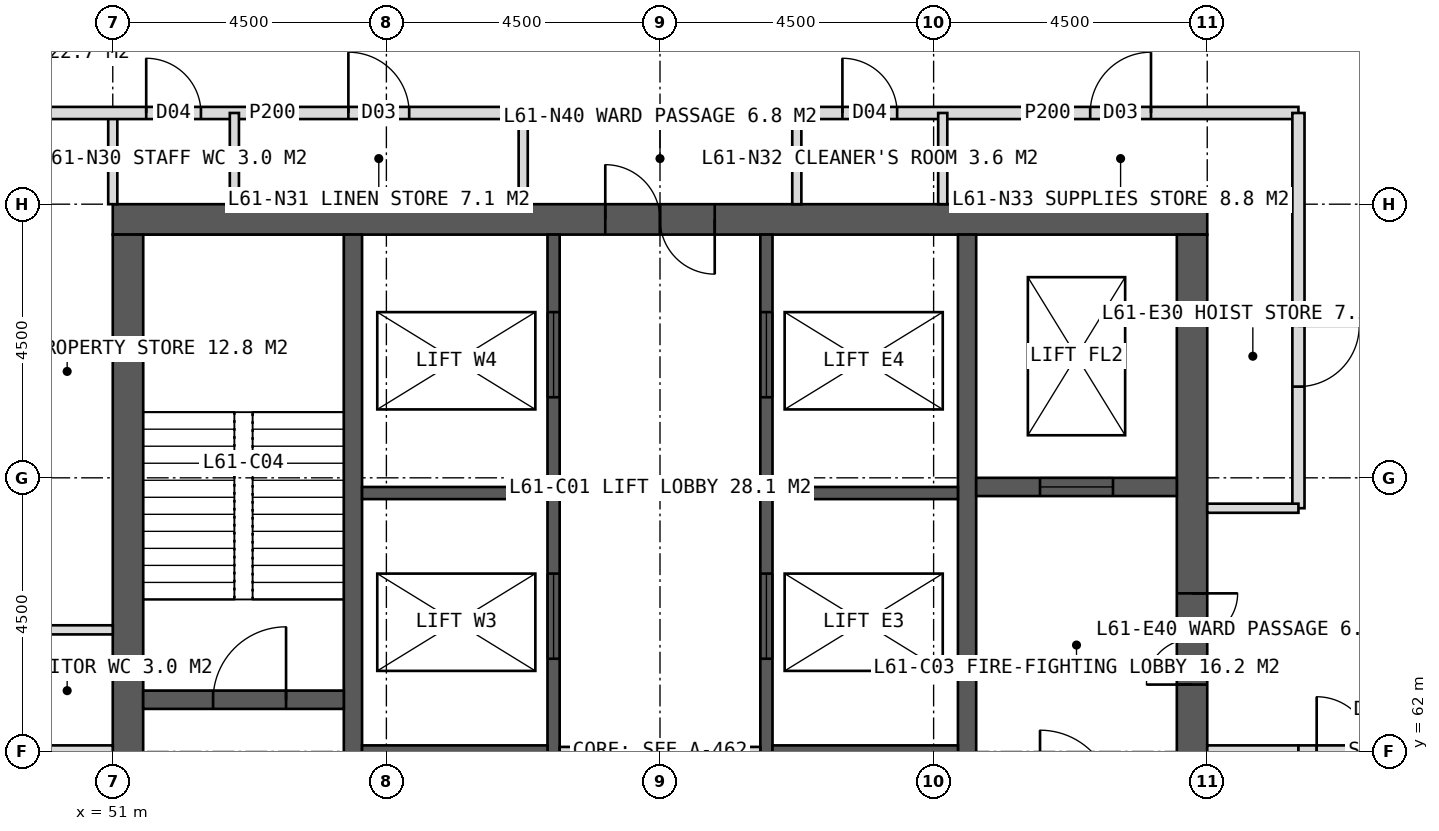
"""IFC4 building model, lengths in metres.
Left out: names, types, materials, properties, quantities, classifications, styles, units other than length and angle.
Written with IfcOpenShell. Run it as: python <this file> out.ifc"""

import sys

from ifc_helpers import new_model, si_unit, direction, frame, frame_2d, origin, place, context, subcontext, project, spatial, rectangle, extrude, element, fill, save


model = new_model("IFC4")
c1 = context("Model", 3, precision=1e-05, world=origin(), true_north=direction((0.0, 1.0)))
c2 = subcontext(c1, "Body", "Model", "MODEL_VIEW")
j1 = project(units=[si_unit("LENGTHUNIT", "METRE"), si_unit("PLANEANGLEUNIT", "RADIAN")], contexts=[c1])
p1 = place(None, origin())
s1 = spatial("IfcSite", under=j1, at=p1, CompositionType="ELEMENT")
p2 = place(p1, origin())
s2 = spatial("IfcBuilding", under=s1, at=p2, CompositionType="ELEMENT")
p3 = place(p2, frame((0.0, 0.0, 254.0)))
s3 = spatial("IfcBuildingStorey", under=s2, at=p3, CompositionType="ELEMENT", Elevation=254.0)
p4 = place(p3, frame((51.0, 70.75, 0.0), z_axis=(0.0, 0.0, 1.0), x_axis=(1.0, 0.0, 0.0)))
e1 = element("IfcWall", 1, at=p4, inside=s3, PredefinedType="SHEAR", context=c2, shape_type="SweptSolid", body=[
    extrude(rectangle(XDim=18.0, YDim=0.5, at=frame_2d((9.0, 0.0))), origin(), (0.0, 0.0, 1.0), 4.0),
])
p5 = place(p4, frame((8.1, 0.0, 0.0)))
e2 = element("IfcOpeningElement", 2, at=p5, cuts=e1, PredefinedType="OPENING", context=c2, shape_type="SweptSolid", body=[
    extrude(rectangle(XDim=1.8, YDim=2.2, at=frame_2d((0.9, 1.1))), frame((0.0, 0.26, 0.0), z_axis=(0.0, -1.0, 0.0), x_axis=(1.0, 0.0, 0.0)), (0.0, 0.0, 1.0), 0.52),
])
p6 = place(p3, frame((51.25, 53.5, 0.0), z_axis=(0.0, 0.0, 1.0), x_axis=(0.0, 1.0, 0.0)))
e3 = element("IfcWall", 3, at=p6, inside=s3, PredefinedType="SHEAR", context=c2, shape_type="SweptSolid", body=[
    extrude(rectangle(XDim=17.0, YDim=0.5, at=frame_2d((8.5, 0.0))), origin(), (0.0, 0.0, 1.0), 4.0),
])
p7 = place(p6, frame((6.1, 0.0, 0.0)))
e4 = element("IfcOpeningElement", 4, at=p7, cuts=e3, PredefinedType="OPENING", context=c2, shape_type="SweptSolid", body=[
    extrude(rectangle(XDim=1.5, YDim=2.2, at=frame_2d((0.75, 1.1))), frame((0.0, 0.26, 0.0), z_axis=(0.0, -1.0, 0.0), x_axis=(1.0, 0.0, 0.0)), (0.0, 0.0, 1.0), 0.52),
])
p8 = place(p3, frame((68.75, 53.5, 0.0), z_axis=(0.0, 0.0, 1.0), x_axis=(0.0, 1.0, 0.0)))
e5 = element("IfcWall", 5, at=p8, inside=s3, PredefinedType="SHEAR", context=c2, shape_type="SweptSolid", body=[
    extrude(rectangle(XDim=17.0, YDim=0.5, at=frame_2d((8.5, 0.0))), origin(), (0.0, 0.0, 1.0), 4.0),
])
p9 = place(p8, frame((9.6, 0.0, 0.0)))
e6 = element("IfcOpeningElement", 6, at=p9, cuts=e5, PredefinedType="OPENING", context=c2, shape_type="SweptSolid", body=[
    extrude(rectangle(XDim=1.5, YDim=2.2, at=frame_2d((0.75, 1.1))), frame((0.0, 0.26, 0.0), z_axis=(0.0, -1.0, 0.0), x_axis=(1.0, 0.0, 0.0)), (0.0, 0.0, 1.0), 0.52),
])
for number, where, z_axis, x_axis in (
    (7, (54.95, 53.5, 0.0), (0.0, 0.0, 1.0), (0.0, 1.0, 0.0)),
    (8, (65.05, 53.5, 0.0), (0.0, 0.0, 1.0), (0.0, 1.0, 0.0)),
):
    element("IfcWall", number, at=place(p3, frame(where, z_axis=z_axis, x_axis=x_axis)), inside=s3, PredefinedType="SHEAR", context=c2, shape_type="SweptSolid", body=[
        extrude(rectangle(XDim=17.0, YDim=0.3, at=frame_2d((8.5, 0.0))), origin(), (0.0, 0.0, 1.0), 4.0),
    ])
p10 = place(p3, frame((58.25, 53.5, 0.0), z_axis=(0.0, 0.0, 1.0), x_axis=(0.0, 1.0, 0.0)))
e9 = element("IfcWall", 9, at=p10, inside=s3, PredefinedType="SHEAR", context=c2, shape_type="SweptSolid", body=[
    extrude(rectangle(XDim=17.0, YDim=0.2, at=frame_2d((8.5, 0.0))), origin(), (0.0, 0.0, 1.0), 4.0),
])
p11 = place(p10, frame((0.808, 0.0, 0.0)))
e10 = element("IfcOpeningElement", 10, at=p11, cuts=e9, PredefinedType="OPENING", context=c2, shape_type="SweptSolid", body=[
    extrude(rectangle(XDim=1.0, YDim=2.1, at=frame_2d((0.5, 1.05))), frame((0.0, 0.11, 0.0), z_axis=(0.0, -1.0, 0.0), x_axis=(1.0, 0.0, 0.0)), (0.0, 0.0, 1.0), 0.22),
])
p12 = place(p10, frame((2.958, 0.0, 0.0)))
e11 = element("IfcOpeningElement", 11, at=p12, cuts=e9, PredefinedType="OPENING", context=c2, shape_type="SweptSolid", body=[
    extrude(rectangle(XDim=1.0, YDim=2.1, at=frame_2d((0.5, 1.05))), frame((0.0, 0.11, 0.0), z_axis=(0.0, -1.0, 0.0), x_axis=(1.0, 0.0, 0.0)), (0.0, 0.0, 1.0), 0.22),
])
p13 = place(p10, frame((4.722, 0.0, 0.0)))
e12 = element("IfcOpeningElement", 12, at=p13, cuts=e9, PredefinedType="OPENING", context=c2, shape_type="SweptSolid", body=[
    extrude(rectangle(XDim=1.0, YDim=2.1, at=frame_2d((0.5, 1.05))), frame((0.0, 0.11, 0.0), z_axis=(0.0, -1.0, 0.0), x_axis=(1.0, 0.0, 0.0)), (0.0, 0.0, 1.0), 0.22),
])
p14 = place(p10, frame((6.823, 0.0, 0.0)))
e13 = element("IfcOpeningElement", 13, at=p14, cuts=e9, PredefinedType="OPENING", context=c2, shape_type="SweptSolid", body=[
    extrude(rectangle(XDim=1.0, YDim=2.1, at=frame_2d((0.5, 1.05))), frame((0.0, 0.11, 0.0), z_axis=(0.0, -1.0, 0.0), x_axis=(1.0, 0.0, 0.0)), (0.0, 0.0, 1.0), 0.22),
])
p15 = place(p10, frame((10.025, 0.0, 0.0)))
e14 = element("IfcOpeningElement", 14, at=p15, cuts=e9, PredefinedType="OPENING", context=c2, shape_type="SweptSolid", body=[
    extrude(rectangle(XDim=1.4, YDim=2.2, at=frame_2d((0.7, 1.1))), frame((0.0, 0.11, 0.0), z_axis=(0.0, -1.0, 0.0), x_axis=(1.0, 0.0, 0.0)), (0.0, 0.0, 1.0), 0.22),
])
p16 = place(p10, frame((14.325, 0.0, 0.0)))
e15 = element("IfcOpeningElement", 15, at=p16, cuts=e9, PredefinedType="OPENING", context=c2, shape_type="SweptSolid", body=[
    extrude(rectangle(XDim=1.4, YDim=2.2, at=frame_2d((0.7, 1.1))), frame((0.0, 0.11, 0.0), z_axis=(0.0, -1.0, 0.0), x_axis=(1.0, 0.0, 0.0)), (0.0, 0.0, 1.0), 0.22),
])
p17 = place(p3, frame((61.75, 53.5, 0.0), z_axis=(0.0, 0.0, 1.0), x_axis=(0.0, 1.0, 0.0)))
e16 = element("IfcWall", 16, at=p17, inside=s3, PredefinedType="SHEAR", context=c2, shape_type="SweptSolid", body=[
    extrude(rectangle(XDim=17.0, YDim=0.2, at=frame_2d((8.5, 0.0))), origin(), (0.0, 0.0, 1.0), 4.0),
])
p18 = place(p17, frame((0.496, 0.0, 0.0)))
e17 = element("IfcOpeningElement", 17, at=p18, cuts=e16, PredefinedType="OPENING", context=c2, shape_type="SweptSolid", body=[
    extrude(rectangle(XDim=1.0, YDim=2.1, at=frame_2d((0.5, 1.05))), frame((0.0, 0.11, 0.0), z_axis=(0.0, -1.0, 0.0), x_axis=(1.0, 0.0, 0.0)), (0.0, 0.0, 1.0), 0.22),
])
p19 = place(p17, frame((2.646, 0.0, 0.0)))
e18 = element("IfcOpeningElement", 18, at=p19, cuts=e16, PredefinedType="OPENING", context=c2, shape_type="SweptSolid", body=[
    extrude(rectangle(XDim=1.0, YDim=2.1, at=frame_2d((0.5, 1.05))), frame((0.0, 0.11, 0.0), z_axis=(0.0, -1.0, 0.0), x_axis=(1.0, 0.0, 0.0)), (0.0, 0.0, 1.0), 0.22),
])
p20 = place(p17, frame((5.027, 0.0, 0.0)))
e19 = element("IfcOpeningElement", 19, at=p20, cuts=e16, PredefinedType="OPENING", context=c2, shape_type="SweptSolid", body=[
    extrude(rectangle(XDim=1.0, YDim=2.1, at=frame_2d((0.5, 1.05))), frame((0.0, 0.11, 0.0), z_axis=(0.0, -1.0, 0.0), x_axis=(1.0, 0.0, 0.0)), (0.0, 0.0, 1.0), 0.22),
])
p21 = place(p17, frame((7.126, 0.0, 0.0)))
e20 = element("IfcOpeningElement", 20, at=p21, cuts=e16, PredefinedType="OPENING", context=c2, shape_type="SweptSolid", body=[
    extrude(rectangle(XDim=1.0, YDim=2.1, at=frame_2d((0.5, 1.05))), frame((0.0, 0.11, 0.0), z_axis=(0.0, -1.0, 0.0), x_axis=(1.0, 0.0, 0.0)), (0.0, 0.0, 1.0), 0.22),
])
p22 = place(p17, frame((10.025, 0.0, 0.0)))
e21 = element("IfcOpeningElement", 21, at=p22, cuts=e16, PredefinedType="OPENING", context=c2, shape_type="SweptSolid", body=[
    extrude(rectangle(XDim=1.4, YDim=2.2, at=frame_2d((0.7, 1.1))), frame((0.0, 0.11, 0.0), z_axis=(0.0, -1.0, 0.0), x_axis=(1.0, 0.0, 0.0)), (0.0, 0.0, 1.0), 0.22),
])
p23 = place(p17, frame((14.325, 0.0, 0.0)))
e22 = element("IfcOpeningElement", 22, at=p23, cuts=e16, PredefinedType="OPENING", context=c2, shape_type="SweptSolid", body=[
    extrude(rectangle(XDim=1.4, YDim=2.2, at=frame_2d((0.7, 1.1))), frame((0.0, 0.11, 0.0), z_axis=(0.0, -1.0, 0.0), x_axis=(1.0, 0.0, 0.0)), (0.0, 0.0, 1.0), 0.22),
])
for number, where, z_axis, x_axis in (
    (23, (55.1, 62.0, 0.0), (0.0, 0.0, 1.0), (1.0, 0.0, 0.0)),
    (24, (61.85, 62.0, 0.0), (0.0, 0.0, 1.0), (1.0, 0.0, 0.0)),
    (25, (55.1, 66.25, 0.0), (0.0, 0.0, 1.0), (1.0, 0.0, 0.0)),
    (26, (61.85, 66.25, 0.0), (0.0, 0.0, 1.0), (1.0, 0.0, 0.0)),
):
    element("IfcWall", number, at=place(p3, frame(where, z_axis=z_axis, x_axis=x_axis)), inside=s3, PredefinedType="SHEAR", context=c2, shape_type="SweptSolid", body=[
        extrude(rectangle(XDim=3.05, YDim=0.2, at=frame_2d((1.525, 0.0))), origin(), (0.0, 0.0, 1.0), 4.0),
    ])
p24 = place(p3, frame((51.5, 62.85, 0.0), z_axis=(0.0, 0.0, 1.0), x_axis=(1.0, 0.0, 0.0)))
e27 = element("IfcWall", 27, at=p24, inside=s3, PredefinedType="SHEAR", context=c2, shape_type="SweptSolid", body=[
    extrude(rectangle(XDim=3.3, YDim=0.3, at=frame_2d((1.65, 0.0))), origin(), (0.0, 0.0, 1.0), 4.0),
])
p25 = place(p24, frame((1.15, 0.0, 0.0)))
e28 = element("IfcOpeningElement", 28, at=p25, cuts=e27, PredefinedType="OPENING", context=c2, shape_type="SweptSolid", body=[
    extrude(rectangle(XDim=1.2, YDim=2.1, at=frame_2d((0.6, 1.05))), frame((0.0, 0.16, 0.0), z_axis=(0.0, -1.0, 0.0), x_axis=(1.0, 0.0, 0.0)), (0.0, 0.0, 1.0), 0.32),
])
p26 = place(p3, frame((65.2, 66.35, 0.0), z_axis=(0.0, 0.0, 1.0), x_axis=(1.0, 0.0, 0.0)))
e29 = element("IfcWall", 29, at=p26, inside=s3, PredefinedType="SHEAR", context=c2, shape_type="SweptSolid", body=[
    extrude(rectangle(XDim=3.3, YDim=0.3, at=frame_2d((1.65, 0.0))), origin(), (0.0, 0.0, 1.0), 4.0),
])
p27 = place(p26, frame((1.05, 0.0, 0.0)))
e30 = element("IfcOpeningElement", 30, at=p27, cuts=e29, PredefinedType="OPENING", context=c2, shape_type="SweptSolid", body=[
    extrude(rectangle(XDim=1.2, YDim=2.2, at=frame_2d((0.6, 1.1))), frame((0.0, 0.16, 0.0), z_axis=(0.0, -1.0, 0.0), x_axis=(1.0, 0.0, 0.0)), (0.0, 0.0, 1.0), 0.32),
])
p28 = place(p3, frame((51.0, 71.0, 0.0), z_axis=(0.0, 0.0, 1.0), x_axis=(0.0, 1.0, 0.0)))
e31 = element("IfcWall", 31, at=p28, inside=s3, PredefinedType="PARTITIONING", context=c2, shape_type="SweptSolid", body=[
    extrude(rectangle(XDim=1.5, YDim=0.15, at=frame_2d((0.75, 0.0))), origin(), (0.0, 0.0, 1.0), 3.75),
])
p29 = place(p3, frame((49.5, 72.5, 0.0), z_axis=(0.0, 0.0, 1.0), x_axis=(1.0, 0.0, 0.0)))
e32 = element("IfcWall", 32, at=p29, inside=s3, PredefinedType="PARTITIONING", context=c2, shape_type="SweptSolid", body=[
    extrude(rectangle(XDim=8.25, YDim=0.2, at=frame_2d((4.125, 0.0))), origin(), (0.0, 0.0, 1.0), 3.75),
])
p30 = place(p29, frame((2.05, 0.0, 0.0)))
e33 = element("IfcOpeningElement", 33, at=p30, cuts=e32, PredefinedType="OPENING", context=c2, shape_type="SweptSolid", body=[
    extrude(rectangle(XDim=0.9, YDim=2.1, at=frame_2d((0.45, 1.05))), frame((0.0, 0.11, 0.0), z_axis=(0.0, -1.0, 0.0), x_axis=(1.0, 0.0, 0.0)), (0.0, 0.0, 1.0), 0.22),
])
p31 = place(p29, frame((5.375, 0.0, 0.0)))
e34 = element("IfcOpeningElement", 34, at=p31, cuts=e32, PredefinedType="OPENING", context=c2, shape_type="SweptSolid", body=[
    extrude(rectangle(XDim=1.0, YDim=2.1, at=frame_2d((0.5, 1.05))), frame((0.0, 0.11, 0.0), z_axis=(0.0, -1.0, 0.0), x_axis=(1.0, 0.0, 0.0)), (0.0, 0.0, 1.0), 0.22),
])
p32 = place(p3, frame((62.25, 72.5, 0.0), z_axis=(0.0, 0.0, 1.0), x_axis=(1.0, 0.0, 0.0)))
e35 = element("IfcWall", 35, at=p32, inside=s3, PredefinedType="PARTITIONING", context=c2, shape_type="SweptSolid", body=[
    extrude(rectangle(XDim=8.25, YDim=0.2, at=frame_2d((4.125, 0.0))), origin(), (0.0, 0.0, 1.0), 3.75),
])
p33 = place(p32, frame((0.75, 0.0, 0.0)))
e36 = element("IfcOpeningElement", 36, at=p33, cuts=e35, PredefinedType="OPENING", context=c2, shape_type="SweptSolid", body=[
    extrude(rectangle(XDim=0.9, YDim=2.1, at=frame_2d((0.45, 1.05))), frame((0.0, 0.11, 0.0), z_axis=(0.0, -1.0, 0.0), x_axis=(1.0, 0.0, 0.0)), (0.0, 0.0, 1.0), 0.22),
])
p34 = place(p32, frame((4.825, 0.0, 0.0)))
e37 = element("IfcOpeningElement", 37, at=p34, cuts=e35, PredefinedType="OPENING", context=c2, shape_type="SweptSolid", body=[
    extrude(rectangle(XDim=1.0, YDim=2.1, at=frame_2d((0.5, 1.05))), frame((0.0, 0.11, 0.0), z_axis=(0.0, -1.0, 0.0), x_axis=(1.0, 0.0, 0.0)), (0.0, 0.0, 1.0), 0.22),
])
for number, where, z_axis, x_axis in (
    (38, (57.75, 71.0, 0.0), (0.0, 0.0, 1.0), (0.0, 1.0, 0.0)),
    (39, (62.25, 71.0, 0.0), (0.0, 0.0, 1.0), (0.0, 1.0, 0.0)),
    (40, (53.0, 71.0, 0.0), (0.0, 0.0, 1.0), (0.0, 1.0, 0.0)),
):
    element("IfcWall", number, at=place(p3, frame(where, z_axis=z_axis, x_axis=x_axis)), inside=s3, PredefinedType="PARTITIONING", context=c2, shape_type="SweptSolid", body=[
        extrude(rectangle(XDim=1.5, YDim=0.15, at=frame_2d((0.75, 0.0))), origin(), (0.0, 0.0, 1.0), 3.75),
    ])
p35 = place(p3, frame((64.65, 71.0, 0.0), z_axis=(0.0, 0.0, 1.0), x_axis=(0.0, 1.0, 0.0)))
e41 = element("IfcWall", 41, at=p35, inside=s3, PredefinedType="PARTITIONING", context=c2, shape_type="SweptSolid", body=[
    extrude(rectangle(XDim=1.5, YDim=0.15, at=frame_2d((0.75, 0.0))), origin(), (0.0, 0.0, 1.0), 2.95),
])
p36 = place(p3, frame((51.0, 62.0, 0.0), z_axis=(0.0, 0.0, 1.0), x_axis=(-1.0, 0.0, 0.0)))
e42 = element("IfcWall", 42, at=p36, inside=s3, PredefinedType="SOLIDWALL", context=c2, shape_type="SweptSolid", body=[
    extrude(rectangle(XDim=1.5, YDim=0.2, at=frame_2d((0.75, 0.0))), origin(), (0.0, 0.0, 1.0), 2.75),
])
for number, where, z_axis, x_axis in (
    (43, (51.0, 64.0, 0.0), (0.0, 0.0, 1.0), (-1.0, 0.0, 0.0)),
    (44, (69.0, 71.0, 0.0), (0.0, 0.0, 1.0), (1.0, 0.0, 0.0)),
):
    element("IfcWall", number, at=place(p3, frame(where, z_axis=z_axis, x_axis=x_axis)), inside=s3, PredefinedType="PARTITIONING", context=c2, shape_type="SweptSolid", body=[
        extrude(rectangle(XDim=1.5, YDim=0.15, at=frame_2d((0.75, 0.0))), origin(), (0.0, 0.0, 1.0), 3.75),
    ])
p37 = place(p3, frame((70.5, 72.5, 0.0), z_axis=(0.0, 0.0, 1.0), x_axis=(0.0, -1.0, 0.0)))
e45 = element("IfcWall", 45, at=p37, inside=s3, PredefinedType="PARTITIONING", context=c2, shape_type="SweptSolid", body=[
    extrude(rectangle(XDim=6.5, YDim=0.2, at=frame_2d((3.25, 0.0))), origin(), (0.0, 0.0, 1.0), 3.75),
])
p38 = place(p37, frame((3.5, 0.0, 0.0)))
e46 = element("IfcOpeningElement", 46, at=p38, cuts=e45, PredefinedType="OPENING", context=c2, shape_type="SweptSolid", body=[
    extrude(rectangle(XDim=1.0, YDim=2.1, at=frame_2d((0.5, 1.05))), frame((0.0, 0.11, 0.0), z_axis=(0.0, -1.0, 0.0), x_axis=(1.0, 0.0, 0.0)), (0.0, 0.0, 1.0), 0.22),
])
p39 = place(p3, frame((69.0, 66.0, 0.0), z_axis=(0.0, 0.0, 1.0), x_axis=(1.0, 0.0, 0.0)))
e47 = element("IfcWall", 47, at=p39, inside=s3, PredefinedType="PARTITIONING", context=c2, shape_type="SweptSolid", body=[
    extrude(rectangle(XDim=1.5, YDim=0.15, at=frame_2d((0.75, 0.0))), origin(), (0.0, 0.0, 1.0), 3.75),
])
p40 = place(p3, frame((69.0, 62.0, 0.0), z_axis=(0.0, 0.0, 1.0), x_axis=(1.0, 0.0, 0.0)))
e48 = element("IfcWall", 48, at=p40, inside=s3, PredefinedType="SOLIDWALL", context=c2, shape_type="SweptSolid", body=[
    extrude(rectangle(XDim=1.5, YDim=0.2, at=frame_2d((0.75, 0.0))), origin(), (0.0, 0.0, 1.0), 2.75),
])
p41 = place(p3, frame((70.5, 62.0, 0.0), z_axis=(0.0, 0.0, 1.0), x_axis=(1.0, 0.0, 0.0)))
e49 = element("IfcWall", 49, at=p41, inside=s3, PredefinedType="SOLIDWALL", context=c2, shape_type="SweptSolid", body=[
    extrude(rectangle(XDim=2.6, YDim=0.2, at=frame_2d((1.3, 0.0))), origin(), (0.0, 0.0, 1.0), 2.75),
])
p42 = place(p41, frame((0.3, 0.0, 0.0)))
e50 = element("IfcOpeningElement", 50, at=p42, cuts=e49, PredefinedType="OPENING", context=c2, shape_type="SweptSolid", body=[
    extrude(rectangle(XDim=1.8, YDim=2.2, at=frame_2d((0.9, 1.1))), frame((0.0, 0.11, 0.0), z_axis=(0.0, -1.0, 0.0), x_axis=(1.0, 0.0, 0.0)), (0.0, 0.0, 1.0), 0.22),
])
p43 = place(p3, frame((58.35, 62.0, 0.0), z_axis=(0.0, 0.0, 1.0), x_axis=(1.0, 0.0, 0.0)))
e51 = element("IfcWall", 51, at=p43, inside=s3, PredefinedType="PARTITIONING", context=c2, shape_type="SweptSolid", body=[
    extrude(rectangle(XDim=3.3, YDim=0.15, at=frame_2d((1.65, 0.0))), origin(), (0.0, 0.0, 1.0), 3.75),
])
p44 = place(p30, origin())
e52 = element("IfcDoor", 52, at=p44, inside=s3, OperationType="SINGLE_SWING_LEFT", PredefinedType="DOOR", context=c2, shape_type="SweptSolid", body=[
    extrude(rectangle(XDim=0.9, YDim=2.1, at=frame_2d((0.45, 1.05))), frame((0.0, 0.025, 0.0), z_axis=(0.0, -1.0, 0.0), x_axis=(1.0, 0.0, 0.0)), (0.0, 0.0, 1.0), 0.05),
])
fill(e33, e52)
p45 = place(p31, origin())
e53 = element("IfcDoor", 53, at=p45, inside=s3, OperationType="SINGLE_SWING_LEFT", PredefinedType="DOOR", context=c2, shape_type="SweptSolid", body=[
    extrude(rectangle(XDim=1.0, YDim=2.1, at=frame_2d((0.5, 1.05))), frame((0.0, 0.025, 0.0), z_axis=(0.0, -1.0, 0.0), x_axis=(1.0, 0.0, 0.0)), (0.0, 0.0, 1.0), 0.05),
])
fill(e34, e53)
p46 = place(p33, origin())
e54 = element("IfcDoor", 54, at=p46, inside=s3, OperationType="SINGLE_SWING_LEFT", PredefinedType="DOOR", context=c2, shape_type="SweptSolid", body=[
    extrude(rectangle(XDim=0.9, YDim=2.1, at=frame_2d((0.45, 1.05))), frame((0.0, 0.025, 0.0), z_axis=(0.0, -1.0, 0.0), x_axis=(1.0, 0.0, 0.0)), (0.0, 0.0, 1.0), 0.05),
])
fill(e36, e54)
p47 = place(p34, origin())
e55 = element("IfcDoor", 55, at=p47, inside=s3, OperationType="SINGLE_SWING_RIGHT", PredefinedType="DOOR", context=c2, shape_type="SweptSolid", body=[
    extrude(rectangle(XDim=1.0, YDim=2.1, at=frame_2d((0.5, 1.05))), frame((0.0, 0.025, 0.0), z_axis=(0.0, -1.0, 0.0), x_axis=(1.0, 0.0, 0.0)), (0.0, 0.0, 1.0), 0.05),
])
fill(e37, e55)
p48 = place(p38, origin())
e56 = element("IfcDoor", 56, at=p48, inside=s3, OperationType="SINGLE_SWING_LEFT", PredefinedType="DOOR", context=c2, shape_type="SweptSolid", body=[
    extrude(rectangle(XDim=1.0, YDim=2.1, at=frame_2d((0.5, 1.05))), frame((0.0, 0.025, 0.0), z_axis=(0.0, -1.0, 0.0), x_axis=(1.0, 0.0, 0.0)), (0.0, 0.0, 1.0), 0.05),
])
fill(e46, e56)
p49 = place(p42, origin())
e57 = element("IfcDoor", 57, at=p49, inside=s3, OperationType="DOUBLE_DOOR_DOUBLE_SWING", PredefinedType="DOOR", context=c2, shape_type="SweptSolid", body=[
    extrude(rectangle(XDim=1.8, YDim=2.2, at=frame_2d((0.9, 1.1))), frame((0.0, 0.025, 0.0), z_axis=(0.0, -1.0, 0.0), x_axis=(1.0, 0.0, 0.0)), (0.0, 0.0, 1.0), 0.05),
])
fill(e50, e57)
p50 = place(p5, origin())
e58 = element("IfcDoor", 58, at=p50, inside=s3, OperationType="DOUBLE_DOOR_SINGLE_SWING", PredefinedType="DOOR", context=c2, shape_type="SweptSolid", body=[
    extrude(rectangle(XDim=1.8, YDim=2.2, at=frame_2d((0.9, 1.1))), frame((0.0, 0.025, 0.0), z_axis=(0.0, -1.0, 0.0), x_axis=(1.0, 0.0, 0.0)), (0.0, 0.0, 1.0), 0.05),
])
fill(e2, e58)
p51 = place(p9, origin())
e59 = element("IfcDoor", 59, at=p51, inside=s3, OperationType="DOUBLE_DOOR_SINGLE_SWING", PredefinedType="DOOR", context=c2, shape_type="SweptSolid", body=[
    extrude(rectangle(XDim=1.5, YDim=2.2, at=frame_2d((0.75, 1.1))), frame((0.0, 0.025, 0.0), z_axis=(0.0, -1.0, 0.0), x_axis=(1.0, 0.0, 0.0)), (0.0, 0.0, 1.0), 0.05),
])
fill(e6, e59)
p52 = place(p25, origin())
e60 = element("IfcDoor", 60, at=p52, inside=s3, OperationType="SINGLE_SWING_RIGHT", PredefinedType="DOOR", context=c2, shape_type="SweptSolid", body=[
    extrude(rectangle(XDim=1.2, YDim=2.1, at=frame_2d((0.6, 1.05))), frame((0.0, 0.025, 0.0), z_axis=(0.0, -1.0, 0.0), x_axis=(1.0, 0.0, 0.0)), (0.0, 0.0, 1.0), 0.05),
])
fill(e28, e60)
p53 = place(p27, origin())
e61 = element("IfcDoor", 61, at=p53, inside=s3, OperationType="SLIDING_TO_LEFT", PredefinedType="DOOR", context=c2, shape_type="SweptSolid", body=[
    extrude(rectangle(XDim=1.2, YDim=2.2, at=frame_2d((0.6, 1.1))), frame((0.0, 0.025, 0.0), z_axis=(0.0, -1.0, 0.0), x_axis=(1.0, 0.0, 0.0)), (0.0, 0.0, 1.0), 0.05),
])
fill(e30, e61)
p54 = place(p15, origin())
e62 = element("IfcDoor", 62, at=p54, inside=s3, OperationType="SLIDING_TO_LEFT", PredefinedType="DOOR", context=c2, shape_type="SweptSolid", body=[
    extrude(rectangle(XDim=1.4, YDim=2.2, at=frame_2d((0.7, 1.1))), frame((0.0, 0.025, 0.0), z_axis=(0.0, -1.0, 0.0), x_axis=(1.0, 0.0, 0.0)), (0.0, 0.0, 1.0), 0.05),
])
fill(e14, e62)
p55 = place(p22, origin())
e63 = element("IfcDoor", 63, at=p55, inside=s3, OperationType="SLIDING_TO_LEFT", PredefinedType="DOOR", context=c2, shape_type="SweptSolid", body=[
    extrude(rectangle(XDim=1.4, YDim=2.2, at=frame_2d((0.7, 1.1))), frame((0.0, 0.025, 0.0), z_axis=(0.0, -1.0, 0.0), x_axis=(1.0, 0.0, 0.0)), (0.0, 0.0, 1.0), 0.05),
])
fill(e21, e63)
p56 = place(p16, origin())
e64 = element("IfcDoor", 64, at=p56, inside=s3, OperationType="SLIDING_TO_LEFT", PredefinedType="DOOR", context=c2, shape_type="SweptSolid", body=[
    extrude(rectangle(XDim=1.4, YDim=2.2, at=frame_2d((0.7, 1.1))), frame((0.0, 0.025, 0.0), z_axis=(0.0, -1.0, 0.0), x_axis=(1.0, 0.0, 0.0)), (0.0, 0.0, 1.0), 0.05),
])
fill(e15, e64)
p57 = place(p23, origin())
e65 = element("IfcDoor", 65, at=p57, inside=s3, OperationType="SLIDING_TO_LEFT", PredefinedType="DOOR", context=c2, shape_type="SweptSolid", body=[
    extrude(rectangle(XDim=1.4, YDim=2.2, at=frame_2d((0.7, 1.1))), frame((0.0, 0.025, 0.0), z_axis=(0.0, -1.0, 0.0), x_axis=(1.0, 0.0, 0.0)), (0.0, 0.0, 1.0), 0.05),
])
fill(e22, e65)
save(model, sys.argv[1])
